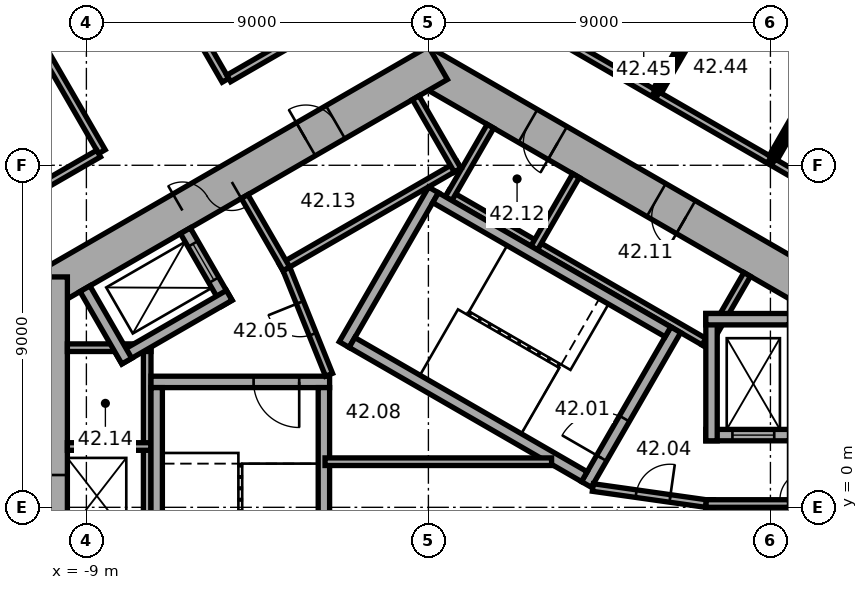
"""IFC4 building model, lengths in metres.
Left out: names, types, materials, properties, quantities, classifications, styles, units other than length and angle.
Written with IfcOpenShell. Run it as: python <this file> out.ifc"""

import sys

from ifc_helpers import new_model, si_unit, direction, frame, frame_2d, origin, place, context, subcontext, project, spatial, rectangle, extrude, element, fill, save


model = new_model("IFC4")
c1 = context("Model", 3, precision=1e-05, world=origin(), true_north=direction((0.0, 1.0)))
c2 = subcontext(c1, "Body", "Model", "MODEL_VIEW")
j1 = project(units=[si_unit("LENGTHUNIT", "METRE"), si_unit("PLANEANGLEUNIT", "RADIAN")], contexts=[c1])
p1 = place(None, origin())
s1 = spatial("IfcSite", under=j1, at=p1, CompositionType="ELEMENT")
p2 = place(p1, origin())
s2 = spatial("IfcBuilding", under=s1, at=p2, CompositionType="ELEMENT")
p3 = place(p2, frame((0.0, 0.0, 172.5)))
s3 = spatial("IfcBuildingStorey", under=s2, at=p3, CompositionType="ELEMENT", Elevation=172.5)
p4 = place(p3, frame((10.25, 5.629, 0.0), z_axis=(0.0, 0.0, 1.0), x_axis=(-0.866022616891, 0.50000482701, 0.0)))
e1 = element("IfcWall", 1, at=p4, inside=s3, PredefinedType="SHEAR", context=c2, shape_type="SweptSolid", body=[
    extrude(rectangle(XDim=12.125, YDim=1.0, at=frame_2d((6.062, 0.0))), origin(), (0.0, 0.0, 1.0), 3.7),
])
p5 = place(p4, frame((4.012, 0.0, 0.0)))
e2 = element("IfcOpeningElement", 2, at=p5, cuts=e1, PredefinedType="OPENING", context=c2, shape_type="SweptSolid", body=[
    extrude(rectangle(XDim=0.9, YDim=2.1, at=frame_2d((0.45, 1.05))), frame((0.0, 0.51, 0.0), z_axis=(0.0, -1.0, 0.0), x_axis=(1.0, 0.0, 0.0)), (0.0, 0.0, 1.0), 1.02),
])
p6 = place(p4, frame((7.912, 0.0, 0.0)))
e3 = element("IfcOpeningElement", 3, at=p6, cuts=e1, PredefinedType="OPENING", context=c2, shape_type="SweptSolid", body=[
    extrude(rectangle(XDim=0.9, YDim=2.1, at=frame_2d((0.45, 1.05))), frame((0.0, 0.51, 0.0), z_axis=(0.0, -1.0, 0.0), x_axis=(1.0, 0.0, 0.0)), (0.0, 0.0, 1.0), 1.02),
])
p7 = place(p3, frame((0.25, 11.691, 0.0), z_axis=(0.0, 0.0, 1.0), x_axis=(-0.866022616891, -0.50000482701, 0.0)))
e4 = element("IfcWall", 4, at=p7, inside=s3, PredefinedType="SHEAR", context=c2, shape_type="SweptSolid", body=[
    extrude(rectangle(XDim=12.125, YDim=1.0, at=frame_2d((6.062, 0.0))), origin(), (0.0, 0.0, 1.0), 3.7),
])
p8 = place(p7, frame((6.262, 0.0, 0.0)))
e5 = element("IfcOpeningElement", 5, at=p8, cuts=e4, PredefinedType="OPENING", context=c2, shape_type="SweptSolid", body=[
    extrude(rectangle(XDim=1.5, YDim=2.1, at=frame_2d((0.75, 1.05))), frame((0.0, 0.51, 0.0), z_axis=(0.0, -1.0, 0.0), x_axis=(1.0, 0.0, 0.0)), (0.0, 0.0, 1.0), 1.02),
])
p9 = place(p7, frame((3.112, 0.0, 0.0)))
e6 = element("IfcOpeningElement", 6, at=p9, cuts=e4, PredefinedType="OPENING", context=c2, shape_type="SweptSolid", body=[
    extrude(rectangle(XDim=0.9, YDim=2.1, at=frame_2d((0.45, 1.05))), frame((0.0, 0.51, 0.0), z_axis=(0.0, -1.0, 0.0), x_axis=(1.0, 0.0, 0.0)), (0.0, 0.0, 1.0), 1.02),
])
p10 = place(p3, frame((-10.0, 6.062, 0.0), z_axis=(0.0, 0.0, 1.0), x_axis=(0.0, -1.0, 0.0)))
e7 = element("IfcWall", 7, at=p10, inside=s3, PredefinedType="SHEAR", context=c2, shape_type="SweptSolid", body=[
    extrude(rectangle(XDim=12.125, YDim=1.0, at=frame_2d((6.062, 0.0))), origin(), (0.0, 0.0, 1.0), 3.7),
])
p11 = place(p10, frame((5.212, 0.0, 0.0)))
e8 = element("IfcOpeningElement", 8, at=p11, cuts=e7, PredefinedType="OPENING", context=c2, shape_type="SweptSolid", body=[
    extrude(rectangle(XDim=1.1, YDim=2.1, at=frame_2d((0.55, 1.05))), frame((0.0, 0.51, 0.0), z_axis=(0.0, -1.0, 0.0), x_axis=(1.0, 0.0, 0.0)), (0.0, 0.0, 1.0), 1.02),
])
p12 = place(p10, frame((7.812, 0.0, 0.0)))
e9 = element("IfcOpeningElement", 9, at=p12, cuts=e7, PredefinedType="OPENING", context=c2, shape_type="SweptSolid", body=[
    extrude(rectangle(XDim=1.1, YDim=2.1, at=frame_2d((0.55, 1.05))), frame((0.0, 0.51, 0.0), z_axis=(0.0, -1.0, 0.0), x_axis=(1.0, 0.0, 0.0)), (0.0, 0.0, 1.0), 1.02),
])
p13 = place(p3, frame((7.4, -5.2, 0.0), z_axis=(0.0, 0.0, 1.0), x_axis=(0.0, 1.0, 0.0)))
e10 = element("IfcWall", 10, at=p13, inside=s3, PredefinedType="PARTITIONING", context=c2, shape_type="SweptSolid", body=[
    extrude(rectangle(XDim=5.4, YDim=0.2, at=frame_2d((2.7, 0.0))), origin(), (0.0, 0.0, 1.0), 3.42),
])
p14 = place(p3, frame((7.3, 0.1, 0.0), z_axis=(0.0, 0.0, 1.0), x_axis=(1.0, 0.0, 0.0)))
e11 = element("IfcWall", 11, at=p14, inside=s3, PredefinedType="PARTITIONING", context=c2, shape_type="SweptSolid", body=[
    extrude(rectangle(XDim=2.2, YDim=0.2, at=frame_2d((1.1, 0.0))), origin(), (0.0, 0.0, 1.0), 3.42),
])
p15 = place(p3, frame((7.424, 4.259, 0.0), z_axis=(0.0, 0.0, 1.0), x_axis=(-0.866026010844, 0.49999894854, 0.0)))
e12 = element("IfcWall", 12, at=p15, inside=s3, PredefinedType="PARTITIONING", context=c2, shape_type="SweptSolid", body=[
    extrude(rectangle(XDim=8.0, YDim=0.2, at=frame_2d((4.0, 0.0))), origin(), (0.0, 0.0, 1.0), 3.42),
])
for number, where, z_axis, x_axis in (
    (13, (7.287, 4.222, 0.0), (0.0, 0.0, 1.0), (0.5, 0.866, 0.0)),
    (14, (2.784, 6.822, 0.0), (0.0, 0.0, 1.0), (0.5, 0.866, 0.0)),
    (15, (0.532, 8.122, 0.0), (0.0, 0.0, 1.0), (0.5, 0.866, 0.0)),
):
    element("IfcWall", number, at=place(p3, frame(where, z_axis=z_axis, x_axis=x_axis)), inside=s3, PredefinedType="PARTITIONING", context=c2, shape_type="SweptSolid", body=[
        extrude(rectangle(XDim=2.2, YDim=0.2, at=frame_2d((1.1, 0.0))), origin(), (0.0, 0.0, 1.0), 3.42),
    ])
p16 = place(p3, frame((0.803, 9.009, 0.0), z_axis=(0.0, 0.0, 1.0), x_axis=(-0.866028230842, -0.499995103361, 0.0)))
e16 = element("IfcWall", 16, at=p16, inside=s3, PredefinedType="PARTITIONING", context=c2, shape_type="SweptSolid", body=[
    extrude(rectangle(XDim=5.4, YDim=0.2, at=frame_2d((2.7, 0.0))), origin(), (0.0, 0.0, 1.0), 3.42),
])
p17 = place(p3, frame((0.767, 8.872, 0.0), z_axis=(0.0, 0.0, 1.0), x_axis=(-0.499994660107, 0.866028486751, 0.0)))
e17 = element("IfcWall", 17, at=p17, inside=s3, PredefinedType="PARTITIONING", context=c2, shape_type="SweptSolid", body=[
    extrude(rectangle(XDim=2.2, YDim=0.2, at=frame_2d((1.1, 0.0))), origin(), (0.0, 0.0, 1.0), 3.42),
])
p18 = place(p3, frame((-3.737, 6.272, 0.0), z_axis=(0.0, 0.0, 1.0), x_axis=(-0.50002983664, 0.866008176907, 0.0)))
e18 = element("IfcWall", 18, at=p18, inside=s3, PredefinedType="PARTITIONING", context=c2, shape_type="SweptSolid", body=[
    extrude(rectangle(XDim=2.2, YDim=0.2, at=frame_2d((1.1, 0.0))), origin(), (0.0, 0.0, 1.0), 3.42),
])
p19 = place(p3, frame((-7.4, 4.3, 0.0), z_axis=(0.0, 0.0, 1.0), x_axis=(0.0, -1.0, 0.0)))
e19 = element("IfcWall", 19, at=p19, inside=s3, PredefinedType="PARTITIONING", context=c2, shape_type="SweptSolid", body=[
    extrude(rectangle(XDim=8.0, YDim=0.2, at=frame_2d((4.0, 0.0))), origin(), (0.0, 0.0, 1.0), 3.42),
])
for number, where, z_axis, x_axis in (
    (20, (-7.3, 4.2, 0.0), (0.0, 0.0, 1.0), (-1.0, 0.0, 0.0)),
    (21, (-7.3, 1.6, 0.0), (0.0, 0.0, 1.0), (-1.0, 0.0, 0.0)),
):
    element("IfcWall", number, at=place(p3, frame(where, z_axis=z_axis, x_axis=x_axis)), inside=s3, PredefinedType="PARTITIONING", context=c2, shape_type="SweptSolid", body=[
        extrude(rectangle(XDim=2.2, YDim=0.2, at=frame_2d((1.1, 0.0))), origin(), (0.0, 0.0, 1.0), 3.42),
    ])
p20 = place(p3, frame((4.158, 0.602, 0.0), z_axis=(0.0, 0.0, 1.0), x_axis=(0.499977259774, 0.866038532462, 0.0)))
e22 = element("IfcWall", 22, at=p20, inside=s3, PredefinedType="SHEAR", context=c2, shape_type="SweptSolid", body=[
    extrude(rectangle(XDim=4.7, YDim=0.3, at=frame_2d((2.35, 0.0))), origin(), (0.0, 0.0, 1.0), 3.42),
])
p21 = place(p20, frame((0.8, 0.0, 0.0)))
e23 = element("IfcOpeningElement", 23, at=p21, cuts=e22, PredefinedType="OPENING", context=c2, shape_type="SweptSolid", body=[
    extrude(rectangle(XDim=1.2, YDim=2.1, at=frame_2d((0.6, 1.05))), frame((0.0, 0.16, 0.0), z_axis=(0.0, -1.0, 0.0), x_axis=(1.0, 0.0, 0.0)), (0.0, 0.0, 1.0), 0.32),
])
p22 = place(p3, frame((-2.216, 4.282, 0.0), z_axis=(0.0, 0.0, 1.0), x_axis=(0.499977259774, 0.866038532462, 0.0)))
e24 = element("IfcWall", 24, at=p22, inside=s3, PredefinedType="SHEAR", context=c2, shape_type="SweptSolid", body=[
    extrude(rectangle(XDim=4.7, YDim=0.3, at=frame_2d((2.35, 0.0))), origin(), (0.0, 0.0, 1.0), 3.42),
])
for number, where, z_axis, x_axis in (
    (25, (4.103, 0.807, 0.0), (0.0, 0.0, 1.0), (-0.866, 0.5, 0.0)),
    (26, (6.303, 4.617, 0.0), (0.0, 0.0, 1.0), (-0.866, 0.5, 0.0)),
):
    element("IfcWall", number, at=place(p3, frame(where, z_axis=z_axis, x_axis=x_axis)), inside=s3, PredefinedType="SHEAR", context=c2, shape_type="SweptSolid", body=[
        extrude(rectangle(XDim=7.06, YDim=0.3, at=frame_2d((3.53, 0.0))), origin(), (0.0, 0.0, 1.0), 3.42),
    ])
p23 = place(p3, frame((-2.6, 3.3, 0.0), z_axis=(0.0, 0.0, 1.0), x_axis=(-1.0, 0.0, 0.0)))
e27 = element("IfcWall", 27, at=p23, inside=s3, PredefinedType="SHEAR", context=c2, shape_type="SweptSolid", body=[
    extrude(rectangle(XDim=4.7, YDim=0.3, at=frame_2d((2.35, 0.0))), origin(), (0.0, 0.0, 1.0), 3.42),
])
p24 = place(p23, frame((0.8, 0.0, 0.0)))
e28 = element("IfcOpeningElement", 28, at=p24, cuts=e27, PredefinedType="OPENING", context=c2, shape_type="SweptSolid", body=[
    extrude(rectangle(XDim=1.2, YDim=2.1, at=frame_2d((0.6, 1.05))), frame((0.0, 0.16, 0.0), z_axis=(0.0, -1.0, 0.0), x_axis=(1.0, 0.0, 0.0)), (0.0, 0.0, 1.0), 0.32),
])
for number, where, z_axis, x_axis in (
    (29, (-2.75, 3.15, 0.0), (0.0, 0.0, 1.0), (0.0, -1.0, 0.0)),
    (30, (-7.15, 3.15, 0.0), (0.0, 0.0, 1.0), (0.0, -1.0, 0.0)),
):
    element("IfcWall", number, at=place(p3, frame(where, z_axis=z_axis, x_axis=x_axis)), inside=s3, PredefinedType="SHEAR", context=c2, shape_type="SweptSolid", body=[
        extrude(rectangle(XDim=7.06, YDim=0.3, at=frame_2d((3.53, 0.0))), origin(), (0.0, 0.0, 1.0), 3.42),
    ])
p25 = place(p3, frame((7.3, 1.9, 0.0), z_axis=(0.0, 0.0, 1.0), x_axis=(1.0, 0.0, 0.0)))
e31 = element("IfcWall", 31, at=p25, inside=s3, PredefinedType="SHEAR", context=c2, shape_type="SweptSolid", body=[
    extrude(rectangle(XDim=2.2, YDim=0.3, at=frame_2d((1.1, 0.0))), origin(), (0.0, 0.0, 1.0), 3.42),
])
p26 = place(p25, frame((0.7, 0.0, 0.0)))
e32 = element("IfcOpeningElement", 32, at=p26, cuts=e31, PredefinedType="OPENING", context=c2, shape_type="SweptSolid", body=[
    extrude(rectangle(XDim=1.1, YDim=2.1, at=frame_2d((0.55, 1.05))), frame((0.0, 0.16, 0.0), z_axis=(0.0, -1.0, 0.0), x_axis=(1.0, 0.0, 0.0)), (0.0, 0.0, 1.0), 0.32),
])
p27 = place(p3, frame((7.45, 1.75, 0.0), z_axis=(0.0, 0.0, 1.0), x_axis=(0.0, 1.0, 0.0)))
e33 = element("IfcWall", 33, at=p27, inside=s3, PredefinedType="SHEAR", context=c2, shape_type="SweptSolid", body=[
    extrude(rectangle(XDim=3.35, YDim=0.3, at=frame_2d((1.675, 0.0))), origin(), (0.0, 0.0, 1.0), 3.42),
])
p28 = place(p3, frame((7.3, 4.95, 0.0), z_axis=(0.0, 0.0, 1.0), x_axis=(1.0, 0.0, 0.0)))
e34 = element("IfcWall", 34, at=p28, inside=s3, PredefinedType="SHEAR", context=c2, shape_type="SweptSolid", body=[
    extrude(rectangle(XDim=2.2, YDim=0.3, at=frame_2d((1.1, 0.0))), origin(), (0.0, 0.0, 1.0), 3.42),
])
p29 = place(p3, frame((4.327, 0.521, 0.0), z_axis=(0.0, 0.0, 1.0), x_axis=(0.990124376366, -0.14019172346, 0.0)))
e35 = element("IfcWall", 35, at=p29, inside=s3, PredefinedType="PARTITIONING", context=c2, shape_type="SweptSolid", body=[
    extrude(rectangle(XDim=3.002, YDim=0.2, at=frame_2d((1.501, 0.0))), origin(), (0.0, 0.0, 1.0), 3.42),
])
p30 = place(p29, frame((1.15, 0.0, 0.0)))
e36 = element("IfcOpeningElement", 36, at=p30, cuts=e35, PredefinedType="OPENING", context=c2, shape_type="SweptSolid", body=[
    extrude(rectangle(XDim=0.9, YDim=2.1, at=frame_2d((0.45, 1.05))), frame((0.0, 0.11, 0.0), z_axis=(0.0, -1.0, 0.0), x_axis=(1.0, 0.0, 0.0)), (0.0, 0.0, 1.0), 0.22),
])
p31 = place(p3, frame((-5.295, 5.372, 0.0), z_axis=(0.0, 0.0, 1.0), x_axis=(-0.500077893725, 0.86598042715, 0.0)))
e37 = element("IfcWall", 37, at=p31, inside=s3, PredefinedType="SHEAR", context=c2, shape_type="SweptSolid", body=[
    extrude(rectangle(XDim=2.2, YDim=0.3, at=frame_2d((1.1, 0.0))), origin(), (0.0, 0.0, 1.0), 3.42),
])
p32 = place(p31, frame((0.7, 0.0, 0.0)))
e38 = element("IfcOpeningElement", 38, at=p32, cuts=e37, PredefinedType="OPENING", context=c2, shape_type="SweptSolid", body=[
    extrude(rectangle(XDim=1.1, YDim=2.1, at=frame_2d((0.55, 1.05))), frame((0.0, 0.16, 0.0), z_axis=(0.0, -1.0, 0.0), x_axis=(1.0, 0.0, 0.0)), (0.0, 0.0, 1.0), 0.32),
])
p33 = place(p3, frame((-5.24, 5.577, 0.0), z_axis=(0.0, 0.0, 1.0), x_axis=(-0.866014461049, -0.500018952895, 0.0)))
e39 = element("IfcWall", 39, at=p33, inside=s3, PredefinedType="SHEAR", context=c2, shape_type="SweptSolid", body=[
    extrude(rectangle(XDim=3.35, YDim=0.3, at=frame_2d((1.675, 0.0))), origin(), (0.0, 0.0, 1.0), 3.42),
])
p34 = place(p3, frame((-7.937, 3.847, 0.0), z_axis=(0.0, 0.0, 1.0), x_axis=(-0.50002983664, 0.866008176907, 0.0)))
e40 = element("IfcWall", 40, at=p34, inside=s3, PredefinedType="SHEAR", context=c2, shape_type="SweptSolid", body=[
    extrude(rectangle(XDim=2.2, YDim=0.3, at=frame_2d((1.1, 0.0))), origin(), (0.0, 0.0, 1.0), 3.42),
])
p35 = place(p3, frame((-2.615, 3.487, 0.0), z_axis=(0.0, 0.0, 1.0), x_axis=(-0.373576831041, 0.92759924068, 0.0)))
e41 = element("IfcWall", 41, at=p35, inside=s3, PredefinedType="PARTITIONING", context=c2, shape_type="SweptSolid", body=[
    extrude(rectangle(XDim=3.002, YDim=0.2, at=frame_2d((1.501, 0.0))), origin(), (0.0, 0.0, 1.0), 3.42),
])
p36 = place(p35, frame((1.15, 0.0, 0.0)))
e42 = element("IfcOpeningElement", 42, at=p36, cuts=e41, PredefinedType="OPENING", context=c2, shape_type="SweptSolid", body=[
    extrude(rectangle(XDim=0.9, YDim=2.1, at=frame_2d((0.45, 1.05))), frame((0.0, 0.11, 0.0), z_axis=(0.0, -1.0, 0.0), x_axis=(1.0, 0.0, 0.0)), (0.0, 0.0, 1.0), 0.22),
])
p37 = place(p3, frame((-2.72, 1.2, 0.0), z_axis=(0.0, 0.0, 1.0), x_axis=(1.0, 0.0, 0.0)))
e43 = element("IfcWall", 43, at=p37, inside=s3, PredefinedType="PARTITIONING", context=c2, shape_type="SweptSolid", body=[
    extrude(rectangle(XDim=5.961, YDim=0.2, at=frame_2d((2.981, 0.0))), origin(), (0.0, 0.0, 1.0), 3.42),
])
p38 = place(p3, frame((-12.766, 16.589, 0.0), z_axis=(0.0, 0.0, 1.0), x_axis=(0.500010139422, -0.866019549707, 0.0)))
e44 = element("IfcWall", 44, at=p38, inside=s3, PredefinedType="PARTITIONING", context=c2, shape_type="SweptSolid", body=[
    extrude(rectangle(XDim=8.35, YDim=0.2, at=frame_2d((4.175, 0.0))), origin(), (0.0, 0.0, 1.0), 3.42),
])
p39 = place(p38, frame((3.675, 0.0, 0.0)))
e45 = element("IfcOpeningElement", 45, at=p39, cuts=e44, PredefinedType="OPENING", context=c2, shape_type="SweptSolid", body=[
    extrude(rectangle(XDim=1.0, YDim=2.1, at=frame_2d((0.5, 1.05))), frame((0.0, 0.11, 0.0), z_axis=(0.0, -1.0, 0.0), x_axis=(1.0, 0.0, 0.0)), (0.0, 0.0, 1.0), 0.22),
])
p40 = place(p3, frame((-9.515, 18.466, 0.0), z_axis=(0.0, 0.0, 1.0), x_axis=(0.500010139422, -0.866019549707, 0.0)))
e46 = element("IfcWall", 46, at=p40, inside=s3, PredefinedType="PARTITIONING", context=c2, shape_type="SweptSolid", body=[
    extrude(rectangle(XDim=8.35, YDim=0.2, at=frame_2d((4.175, 0.0))), origin(), (0.0, 0.0, 1.0), 2.87),
])
p41 = place(p40, frame((3.675, 0.0, 0.0)))
e47 = element("IfcOpeningElement", 47, at=p41, cuts=e46, PredefinedType="OPENING", context=c2, shape_type="SweptSolid", body=[
    extrude(rectangle(XDim=1.0, YDim=2.1, at=frame_2d((0.5, 1.05))), frame((0.0, 0.11, 0.0), z_axis=(0.0, -1.0, 0.0), x_axis=(1.0, 0.0, 0.0)), (0.0, 0.0, 1.0), 0.22),
])
p42 = place(p3, frame((-8.678, 9.308, 0.0), z_axis=(0.0, 0.0, 1.0), x_axis=(-0.866000359435, -0.500043375578, 0.0)))
e48 = element("IfcWall", 48, at=p42, inside=s3, PredefinedType="PARTITIONING", context=c2, shape_type="SweptSolid", body=[
    extrude(rectangle(XDim=3.161, YDim=0.2, at=frame_2d((1.581, 0.0))), origin(), (0.0, 0.0, 1.0), 3.42),
])
p43 = place(p3, frame((-0.95, 13.77, 0.0), z_axis=(0.0, 0.0, 1.0), x_axis=(-0.866036689987, -0.499980451214, 0.0)))
e49 = element("IfcWall", 49, at=p43, inside=s3, PredefinedType="PARTITIONING", context=c2, shape_type="SweptSolid", body=[
    extrude(rectangle(XDim=4.969, YDim=0.2, at=frame_2d((2.485, 0.0))), origin(), (0.0, 0.0, 1.0), 3.42),
])
p44 = place(p3, frame((4.24, 11.986, 0.0), z_axis=(0.0, 0.0, 1.0), x_axis=(0.499952165731, 0.866053019151, 0.0)))
e50 = element("IfcWall", 50, at=p44, inside=s3, PredefinedType="PARTITIONING", context=c2, shape_type="SweptSolid", body=[
    extrude(rectangle(XDim=2.3, YDim=0.12, at=frame_2d((1.15, 0.0))), origin(), (0.0, 0.0, 1.0), 3.42),
])
p45 = place(p44, frame((0.7, 0.0, 0.0)))
e51 = element("IfcOpeningElement", 51, at=p45, cuts=e50, PredefinedType="OPENING", context=c2, shape_type="SweptSolid", body=[
    extrude(rectangle(XDim=0.9, YDim=2.1, at=frame_2d((0.45, 1.05))), frame((0.0, 0.07, 0.0), z_axis=(0.0, -1.0, 0.0), x_axis=(1.0, 0.0, 0.0)), (0.0, 0.0, 1.0), 0.14),
])
p46 = place(p3, frame((5.922, 10.899, 0.0), z_axis=(0.0, 0.0, 1.0), x_axis=(-0.866031556924, 0.499989342298, 0.0)))
e52 = element("IfcWall", 52, at=p46, inside=s3, PredefinedType="PARTITIONING", context=c2, shape_type="SweptSolid", body=[
    extrude(rectangle(XDim=5.701, YDim=0.2, at=frame_2d((2.851, 0.0))), origin(), (0.0, 0.0, 1.0), 3.42),
])
p47 = place(p3, frame((6.076, 10.926, 0.0), z_axis=(0.0, 0.0, 1.0), x_axis=(0.500010275428, 0.866019471182, 0.0)))
e53 = element("IfcWall", 53, at=p47, inside=s3, PredefinedType="PARTITIONING", context=c2, shape_type="SweptSolid", body=[
    extrude(rectangle(XDim=3.5, YDim=0.12, at=frame_2d((1.75, 0.0))), origin(), (0.0, 0.0, 1.0), 3.42),
])
p48 = place(p3, frame((7.092, 12.926, 0.0), z_axis=(0.0, 0.0, 1.0), x_axis=(-0.500030632641, -0.866007717299, 0.0)))
e54 = element("IfcWall", 54, at=p48, inside=s3, PredefinedType="PARTITIONING", context=c2, shape_type="SweptSolid", body=[
    extrude(rectangle(XDim=2.24, YDim=0.12, at=frame_2d((1.12, 0.0))), origin(), (0.0, 0.0, 1.0), 3.42),
])
p49 = place(p3, frame((8.971, 9.139, 0.0), z_axis=(0.0, 0.0, 1.0), x_axis=(-0.866038511948, 0.499977295307, 0.0)))
e55 = element("IfcWall", 55, at=p49, inside=s3, PredefinedType="PARTITIONING", context=c2, shape_type="SweptSolid", body=[
    extrude(rectangle(XDim=3.4, YDim=0.2, at=frame_2d((1.7, 0.0))), origin(), (0.0, 0.0, 1.0), 3.42),
])
p50 = place(p3, frame((9.125, 9.166, 0.0), z_axis=(0.0, 0.0, 1.0), x_axis=(0.500004234368, 0.866022959057, 0.0)))
e56 = element("IfcWall", 56, at=p50, inside=s3, PredefinedType="PARTITIONING", context=c2, shape_type="SweptSolid", body=[
    extrude(rectangle(XDim=2.5, YDim=0.12, at=frame_2d((1.25, 0.0))), origin(), (0.0, 0.0, 1.0), 3.42),
])
p51 = place(p3, frame((10.74, 12.205, 0.0), z_axis=(0.0, 0.0, 1.0), x_axis=(-0.499978425106, -0.866037859697, 0.0)))
e57 = element("IfcWall", 57, at=p51, inside=s3, PredefinedType="PARTITIONING", context=c2, shape_type="SweptSolid", body=[
    extrude(rectangle(XDim=3.44, YDim=0.12, at=frame_2d((1.72, 0.0))), origin(), (0.0, 0.0, 1.0), 3.42),
])
p52 = place(p3, frame((10.98, 7.979, 0.0), z_axis=(0.0, 0.0, 1.0), x_axis=(-0.866008176907, 0.50002983664, 0.0)))
e58 = element("IfcWall", 58, at=p52, inside=s3, PredefinedType="PARTITIONING", context=c2, shape_type="SweptSolid", body=[
    extrude(rectangle(XDim=2.2, YDim=0.2, at=frame_2d((1.1, 0.0))), origin(), (0.0, 0.0, 1.0), 3.42),
])
p53 = place(p8, origin())
e59 = element("IfcDoor", 59, at=p53, inside=s3, OperationType="DOUBLE_DOOR_SINGLE_SWING", PredefinedType="DOOR", context=c2, shape_type="SweptSolid", body=[
    extrude(rectangle(XDim=1.5, YDim=2.1, at=frame_2d((0.75, 1.05))), frame((0.0, 0.025, 0.0), z_axis=(0.0, -1.0, 0.0), x_axis=(1.0, 0.0, 0.0)), (0.0, 0.0, 1.0), 0.05),
])
fill(e5, e59)
p54 = place(p21, origin())
e60 = element("IfcDoor", 60, at=p54, inside=s3, OperationType="SINGLE_SWING_RIGHT", PredefinedType="DOOR", context=c2, shape_type="SweptSolid", body=[
    extrude(rectangle(XDim=1.2, YDim=2.1, at=frame_2d((0.6, 1.05))), frame((0.0, 0.025, 0.0), z_axis=(0.0, -1.0, 0.0), x_axis=(1.0, 0.0, 0.0)), (0.0, 0.0, 1.0), 0.05),
])
fill(e23, e60)
p55 = place(p24, origin())
e61 = element("IfcDoor", 61, at=p55, inside=s3, OperationType="SINGLE_SWING_RIGHT", PredefinedType="DOOR", context=c2, shape_type="SweptSolid", body=[
    extrude(rectangle(XDim=1.2, YDim=2.1, at=frame_2d((0.6, 1.05))), frame((0.0, 0.025, 0.0), z_axis=(0.0, -1.0, 0.0), x_axis=(1.0, 0.0, 0.0)), (0.0, 0.0, 1.0), 0.05),
])
fill(e28, e61)
p56 = place(p30, origin())
e62 = element("IfcDoor", 62, at=p56, inside=s3, OperationType="SINGLE_SWING_LEFT", PredefinedType="DOOR", context=c2, shape_type="SweptSolid", body=[
    extrude(rectangle(XDim=0.9, YDim=2.1, at=frame_2d((0.45, 1.05))), frame((0.0, 0.025, 0.0), z_axis=(0.0, -1.0, 0.0), x_axis=(1.0, 0.0, 0.0)), (0.0, 0.0, 1.0), 0.05),
])
fill(e36, e62)
p57 = place(p36, origin())
e63 = element("IfcDoor", 63, at=p57, inside=s3, OperationType="SINGLE_SWING_LEFT", PredefinedType="DOOR", context=c2, shape_type="SweptSolid", body=[
    extrude(rectangle(XDim=0.9, YDim=2.1, at=frame_2d((0.45, 1.05))), frame((0.0, 0.025, 0.0), z_axis=(0.0, -1.0, 0.0), x_axis=(1.0, 0.0, 0.0)), (0.0, 0.0, 1.0), 0.05),
])
fill(e42, e63)
p58 = place(p5, origin())
e64 = element("IfcDoor", 64, at=p58, inside=s3, OperationType="SINGLE_SWING_LEFT", PredefinedType="DOOR", context=c2, shape_type="SweptSolid", body=[
    extrude(rectangle(XDim=0.9, YDim=2.1, at=frame_2d((0.45, 1.05))), frame((0.0, 0.025, 0.0), z_axis=(0.0, -1.0, 0.0), x_axis=(1.0, 0.0, 0.0)), (0.0, 0.0, 1.0), 0.05),
])
fill(e2, e64)
p59 = place(p6, origin())
e65 = element("IfcDoor", 65, at=p59, inside=s3, OperationType="SINGLE_SWING_LEFT", PredefinedType="DOOR", context=c2, shape_type="SweptSolid", body=[
    extrude(rectangle(XDim=0.9, YDim=2.1, at=frame_2d((0.45, 1.05))), frame((0.0, 0.025, 0.0), z_axis=(0.0, -1.0, 0.0), x_axis=(1.0, 0.0, 0.0)), (0.0, 0.0, 1.0), 0.05),
])
fill(e3, e65)
p60 = place(p9, origin())
e66 = element("IfcDoor", 66, at=p60, inside=s3, OperationType="SINGLE_SWING_LEFT", PredefinedType="DOOR", context=c2, shape_type="SweptSolid", body=[
    extrude(rectangle(XDim=0.9, YDim=2.1, at=frame_2d((0.45, 1.05))), frame((0.0, 0.025, 0.0), z_axis=(0.0, -1.0, 0.0), x_axis=(1.0, 0.0, 0.0)), (0.0, 0.0, 1.0), 0.05),
])
fill(e6, e66)
p61 = place(p26, origin())
e67 = element("IfcDoor", 67, at=p61, inside=s3, OperationType="DOUBLE_DOOR_SLIDING", PredefinedType="DOOR", context=c2, shape_type="SweptSolid", body=[
    extrude(rectangle(XDim=1.1, YDim=2.1, at=frame_2d((0.55, 1.05))), frame((0.0, 0.025, 0.0), z_axis=(0.0, -1.0, 0.0), x_axis=(1.0, 0.0, 0.0)), (0.0, 0.0, 1.0), 0.05),
])
fill(e32, e67)
p62 = place(p32, origin())
e68 = element("IfcDoor", 68, at=p62, inside=s3, OperationType="DOUBLE_DOOR_SLIDING", PredefinedType="DOOR", context=c2, shape_type="SweptSolid", body=[
    extrude(rectangle(XDim=1.1, YDim=2.1, at=frame_2d((0.55, 1.05))), frame((0.0, 0.025, 0.0), z_axis=(0.0, -1.0, 0.0), x_axis=(1.0, 0.0, 0.0)), (0.0, 0.0, 1.0), 0.05),
])
fill(e38, e68)
save(model, sys.argv[1])
